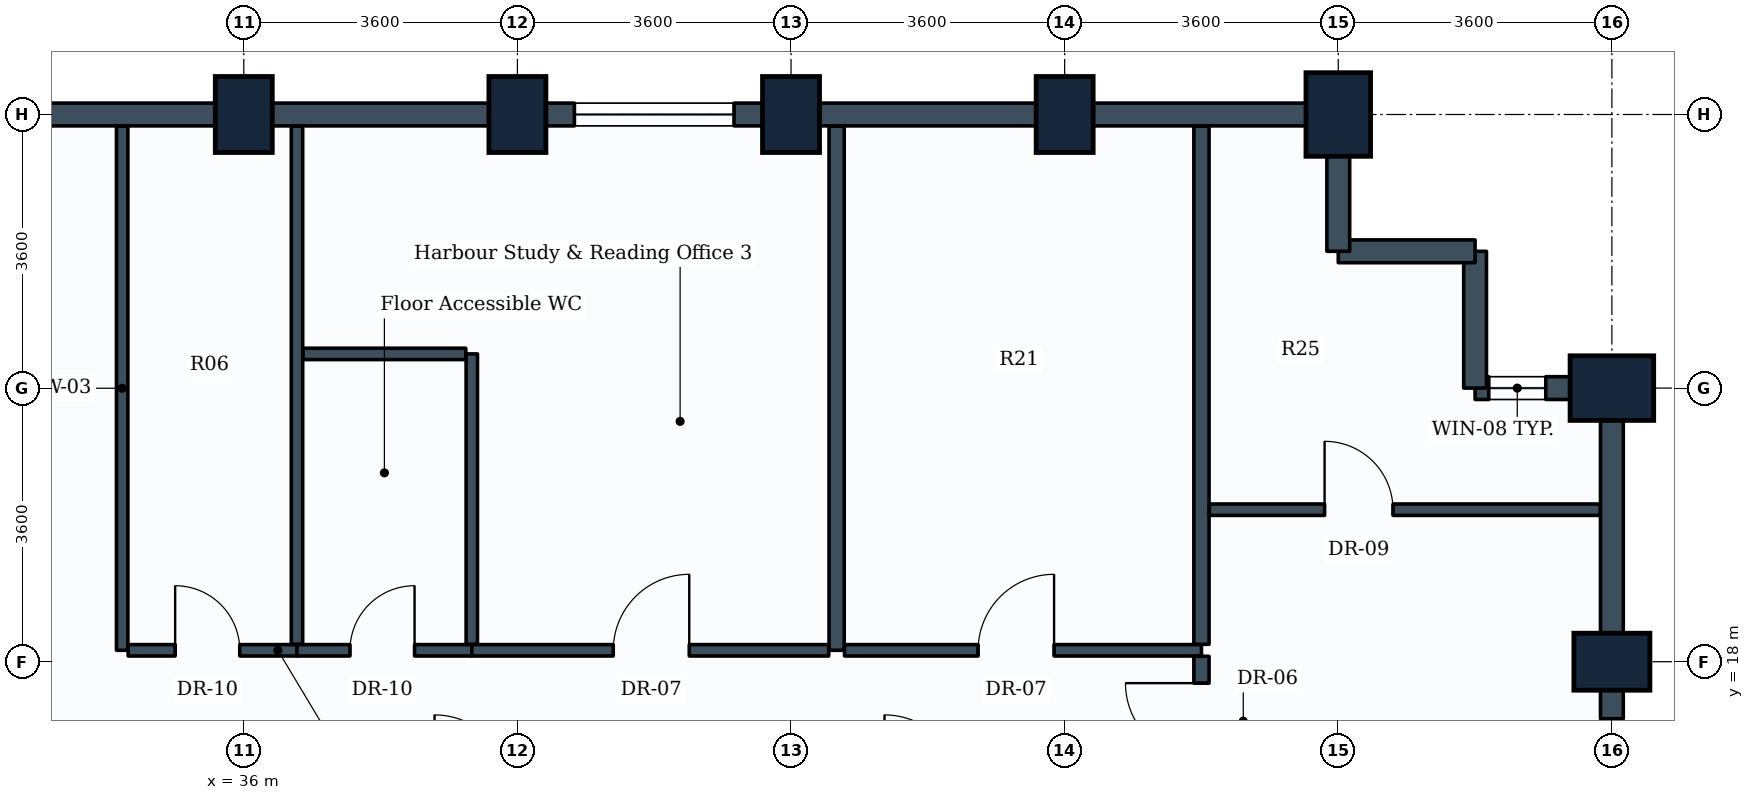
"""IFC4 building model, lengths in metres.
Left out: names, types, materials, properties, quantities, classifications, styles, units other than length and angle.
Written with IfcOpenShell. Run it as: python <this file> out.ifc"""

import sys

from ifc_helpers import new_model, si_unit, direction, frame, frame_2d, origin, origin_2d, place, context, subcontext, project, spatial, rectangle, extrude, element, fill, save


model = new_model("IFC4")
c1 = context("Model", 3, precision=1e-05, world=origin(), true_north=direction((0.0, 1.0)))
c2 = subcontext(c1, "Body", "Model", "MODEL_VIEW")
j1 = project(units=[si_unit("LENGTHUNIT", "METRE"), si_unit("PLANEANGLEUNIT", "RADIAN")], contexts=[c1])
p1 = place(None, origin())
s1 = spatial("IfcSite", under=j1, at=p1, CompositionType="ELEMENT")
p2 = place(p1, origin())
s2 = spatial("IfcBuilding", under=s1, at=p2, CompositionType="ELEMENT")
p3 = place(p2, frame((0.0, 0.0, 131.4)))
s3 = spatial("IfcBuildingStorey", under=s2, at=p3, CompositionType="ELEMENT", Elevation=131.4)
for number, where, z_axis, x_axis in (
    (1, (36.0, 25.2, 0.0), (0.0, 0.0, 1.0), (1.0, 0.0, 0.0)),
    (2, (39.6, 25.2, 0.0), (0.0, 0.0, 1.0), (1.0, 0.0, 0.0)),
    (3, (43.2, 25.2, 0.0), (0.0, 0.0, 1.0), (1.0, 0.0, 0.0)),
    (4, (46.8, 25.2, 0.0), (0.0, 0.0, 1.0), (1.0, 0.0, 0.0)),
):
    element("IfcColumn", number, at=place(p3, frame(where, z_axis=z_axis, x_axis=x_axis)), inside=s3, PredefinedType="COLUMN", context=c2, shape_type="SweptSolid", body=[
        extrude(rectangle(XDim=0.75, YDim=1.0, at=origin_2d()), origin(), (0.0, 0.0, 1.0), 3.8),
    ])
p4 = place(p3, frame((50.4, 25.2, 0.0), z_axis=(0.0, 0.0, 1.0), x_axis=(1.0, 0.0, 0.0)))
e5 = element("IfcColumn", 5, at=p4, inside=s3, PredefinedType="COLUMN", context=c2, shape_type="SweptSolid", body=[
    extrude(rectangle(XDim=0.85, YDim=1.1, at=origin_2d()), origin(), (0.0, 0.0, 1.0), 3.8),
])
p5 = place(p3, frame((54.0, 18.0, 0.0), z_axis=(0.0, 0.0, 1.0), x_axis=(0.0, 1.0, 0.0)))
e6 = element("IfcColumn", 6, at=p5, inside=s3, PredefinedType="COLUMN", context=c2, shape_type="SweptSolid", body=[
    extrude(rectangle(XDim=0.75, YDim=1.0, at=origin_2d()), origin(), (0.0, 0.0, 1.0), 3.8),
])
p6 = place(p3, frame((54.0, 21.6, 0.0), z_axis=(0.0, 0.0, 1.0), x_axis=(0.0, 1.0, 0.0)))
e7 = element("IfcColumn", 7, at=p6, inside=s3, PredefinedType="COLUMN", context=c2, shape_type="SweptSolid", body=[
    extrude(rectangle(XDim=0.85, YDim=1.1, at=origin_2d()), origin(), (0.0, 0.0, 1.0), 3.8),
])
p7 = place(p3, frame((54.0, 18.0, 0.0), z_axis=(0.0, 0.0, 1.0), x_axis=(0.0, -1.0, 0.0)))
e8 = element("IfcWall", 8, at=p7, inside=s3, PredefinedType="STANDARD", context=c2, shape_type="SweptSolid", body=[
    extrude(rectangle(XDim=3.6, YDim=0.3, at=frame_2d((1.8, 0.0))), origin(), (0.0, 0.0, 1.0), 2.93),
])
p8 = place(p7, frame((0.75, 0.0, 0.85)))
e9 = element("IfcOpeningElement", 9, at=p8, cuts=e8, PredefinedType="OPENING", context=c2, shape_type="SweptSolid", body=[
    extrude(rectangle(XDim=2.1, YDim=1.35, at=frame_2d((1.05, 0.675))), frame((0.0, 0.16, 0.0), z_axis=(0.0, -1.0, 0.0), x_axis=(1.0, 0.0, 0.0)), (0.0, 0.0, 1.0), 0.32),
])
p9 = place(p3, frame((54.0, 21.6, 0.0), z_axis=(0.0, 0.0, 1.0), x_axis=(0.0, -1.0, 0.0)))
e10 = element("IfcWall", 10, at=p9, inside=s3, PredefinedType="STANDARD", context=c2, shape_type="SweptSolid", body=[
    extrude(rectangle(XDim=3.6, YDim=0.3, at=frame_2d((1.8, 0.0))), origin(), (0.0, 0.0, 1.0), 2.93),
])
p10 = place(p3, frame((52.2, 21.6, 0.0), z_axis=(0.0, 0.0, 1.0), x_axis=(1.0, 0.0, 0.0)))
e11 = element("IfcWall", 11, at=p10, inside=s3, PredefinedType="STANDARD", context=c2, shape_type="SweptSolid", body=[
    extrude(rectangle(XDim=1.8, YDim=0.3, at=frame_2d((0.9, 0.0))), origin(), (0.0, 0.0, 1.0), 2.93),
])
p11 = place(p10, frame((0.18, 0.0, 0.85)))
e12 = element("IfcOpeningElement", 12, at=p11, cuts=e11, PredefinedType="OPENING", context=c2, shape_type="SweptSolid", body=[
    extrude(rectangle(XDim=0.75, YDim=1.05, at=frame_2d((0.375, 0.525))), frame((0.0, 0.16, 0.0), z_axis=(0.0, -1.0, 0.0), x_axis=(1.0, 0.0, 0.0)), (0.0, 0.0, 1.0), 0.32),
])
p12 = place(p3, frame((52.2, 23.4, 0.0), z_axis=(0.0, 0.0, 1.0), x_axis=(0.0, -1.0, 0.0)))
e13 = element("IfcWall", 13, at=p12, inside=s3, PredefinedType="STANDARD", context=c2, shape_type="SweptSolid", body=[
    extrude(rectangle(XDim=1.8, YDim=0.3, at=frame_2d((0.9, 0.0))), origin(), (0.0, 0.0, 1.0), 3.535),
])
p13 = place(p3, frame((50.4, 23.4, 0.0), z_axis=(0.0, 0.0, 1.0), x_axis=(1.0, 0.0, 0.0)))
e14 = element("IfcWall", 14, at=p13, inside=s3, PredefinedType="STANDARD", context=c2, shape_type="SweptSolid", body=[
    extrude(rectangle(XDim=1.8, YDim=0.3, at=frame_2d((0.9, 0.0))), origin(), (0.0, 0.0, 1.0), 3.535),
])
p14 = place(p3, frame((50.4, 25.2, 0.0), z_axis=(0.0, 0.0, 1.0), x_axis=(0.0, -1.0, 0.0)))
e15 = element("IfcWall", 15, at=p14, inside=s3, PredefinedType="STANDARD", context=c2, shape_type="SweptSolid", body=[
    extrude(rectangle(XDim=1.8, YDim=0.3, at=frame_2d((0.9, 0.0))), origin(), (0.0, 0.0, 1.0), 2.93),
])
p15 = place(p3, frame((46.8, 25.2, 0.0), z_axis=(0.0, 0.0, 1.0), x_axis=(1.0, 0.0, 0.0)))
e16 = element("IfcWall", 16, at=p15, inside=s3, PredefinedType="STANDARD", context=c2, shape_type="SweptSolid", body=[
    extrude(rectangle(XDim=3.6, YDim=0.3, at=frame_2d((1.8, 0.0))), origin(), (0.0, 0.0, 1.0), 2.93),
])
p16 = place(p3, frame((43.2, 25.2, 0.0), z_axis=(0.0, 0.0, 1.0), x_axis=(1.0, 0.0, 0.0)))
e17 = element("IfcWall", 17, at=p16, inside=s3, PredefinedType="STANDARD", context=c2, shape_type="SweptSolid", body=[
    extrude(rectangle(XDim=3.6, YDim=0.3, at=frame_2d((1.8, 0.0))), origin(), (0.0, 0.0, 1.0), 2.93),
])
p17 = place(p3, frame((39.6, 25.2, 0.0), z_axis=(0.0, 0.0, 1.0), x_axis=(1.0, 0.0, 0.0)))
e18 = element("IfcWall", 18, at=p17, inside=s3, PredefinedType="STANDARD", context=c2, shape_type="SweptSolid", body=[
    extrude(rectangle(XDim=3.6, YDim=0.3, at=frame_2d((1.8, 0.0))), origin(), (0.0, 0.0, 1.0), 2.93),
])
p18 = place(p17, frame((0.75, 0.0, 0.85)))
e19 = element("IfcOpeningElement", 19, at=p18, cuts=e18, PredefinedType="OPENING", context=c2, shape_type="SweptSolid", body=[
    extrude(rectangle(XDim=2.1, YDim=1.35, at=frame_2d((1.05, 0.675))), frame((0.0, 0.16, 0.0), z_axis=(0.0, -1.0, 0.0), x_axis=(1.0, 0.0, 0.0)), (0.0, 0.0, 1.0), 0.32),
])
for number, where, z_axis, x_axis in (
    (20, (36.0, 25.2, 0.0), (0.0, 0.0, 1.0), (1.0, 0.0, 0.0)),
    (21, (32.4, 25.2, 0.0), (0.0, 0.0, 1.0), (1.0, 0.0, 0.0)),
):
    element("IfcWall", number, at=place(p3, frame(where, z_axis=z_axis, x_axis=x_axis)), inside=s3, PredefinedType="STANDARD", context=c2, shape_type="SweptSolid", body=[
        extrude(rectangle(XDim=3.6, YDim=0.3, at=frame_2d((1.8, 0.0))), origin(), (0.0, 0.0, 1.0), 2.93),
    ])
p19 = place(p3, frame((34.4, 18.15, 0.0), z_axis=(0.0, 0.0, 1.0), x_axis=(0.0, 1.0, 0.0)))
e22 = element("IfcWall", 22, at=p19, inside=s3, PredefinedType="PARTITIONING", context=c2, shape_type="SweptSolid", body=[
    extrude(rectangle(XDim=6.896, YDim=0.15, at=frame_2d((3.448, 0.0))), origin(), (0.0, 0.0, 1.0), 2.93),
])
p20 = place(p3, frame((34.479, 18.15, 0.0), z_axis=(0.0, 0.0, 1.0), x_axis=(1.0, 0.0, 0.0)))
e23 = element("IfcWall", 23, at=p20, inside=s3, PredefinedType="PARTITIONING", context=c2, shape_type="SweptSolid", body=[
    extrude(rectangle(XDim=2.221, YDim=0.15, at=frame_2d((1.11, 0.0))), origin(), (0.0, 0.0, 1.0), 3.08),
])
p21 = place(p20, frame((0.618, 0.0, 0.0)))
e24 = element("IfcOpeningElement", 24, at=p21, cuts=e23, PredefinedType="OPENING", context=c2, shape_type="SweptSolid", body=[
    extrude(rectangle(XDim=0.85, YDim=2.1, at=frame_2d((0.425, 1.05))), frame((0.0, 0.085, 0.0), z_axis=(0.0, -1.0, 0.0), x_axis=(1.0, 0.0, 0.0)), (0.0, 0.0, 1.0), 0.17),
])
p22 = place(p3, frame((36.7, 18.229, 0.0), z_axis=(0.0, 0.0, 1.0), x_axis=(0.0, 1.0, 0.0)))
e25 = element("IfcWall", 25, at=p22, inside=s3, PredefinedType="PARTITIONING", context=c2, shape_type="SweptSolid", body=[
    extrude(rectangle(XDim=6.817, YDim=0.15, at=frame_2d((3.408, 0.0))), origin(), (0.0, 0.0, 1.0), 2.93),
])
p23 = place(p3, frame((36.7, 18.15, 0.0), z_axis=(0.0, 0.0, 1.0), x_axis=(1.0, 0.0, 0.0)))
e26 = element("IfcWall", 26, at=p23, inside=s3, PredefinedType="PARTITIONING", context=c2, shape_type="SweptSolid", body=[
    extrude(rectangle(XDim=2.3, YDim=0.15, at=frame_2d((1.15, 0.0))), origin(), (0.0, 0.0, 1.0), 3.08),
])
p24 = place(p23, frame((0.697, 0.0, 0.0)))
e27 = element("IfcOpeningElement", 27, at=p24, cuts=e26, PredefinedType="OPENING", context=c2, shape_type="SweptSolid", body=[
    extrude(rectangle(XDim=0.85, YDim=2.1, at=frame_2d((0.425, 1.05))), frame((0.0, 0.085, 0.0), z_axis=(0.0, -1.0, 0.0), x_axis=(1.0, 0.0, 0.0)), (0.0, 0.0, 1.0), 0.17),
])
p25 = place(p3, frame((39.0, 18.229, 0.0), z_axis=(0.0, 0.0, 1.0), x_axis=(0.0, 1.0, 0.0)))
e28 = element("IfcWall", 28, at=p25, inside=s3, PredefinedType="PARTITIONING", context=c2, shape_type="SweptSolid", body=[
    extrude(rectangle(XDim=3.821, YDim=0.15, at=frame_2d((1.911, 0.0))), origin(), (0.0, 0.0, 1.0), 3.08),
])
p26 = place(p3, frame((36.779, 22.05, 0.0), z_axis=(0.0, 0.0, 1.0), x_axis=(1.0, 0.0, 0.0)))
e29 = element("IfcWall", 29, at=p26, inside=s3, PredefinedType="PARTITIONING", context=c2, shape_type="SweptSolid", body=[
    extrude(rectangle(XDim=2.142, YDim=0.15, at=frame_2d((1.071, 0.0))), origin(), (0.0, 0.0, 1.0), 3.535),
])
p27 = place(p3, frame((43.8, 18.15, 0.0), z_axis=(0.0, 0.0, 1.0), x_axis=(0.0, 1.0, 0.0)))
e30 = element("IfcWall", 30, at=p27, inside=s3, PredefinedType="PARTITIONING", context=c2, shape_type="SweptSolid", body=[
    extrude(rectangle(XDim=6.896, YDim=0.2, at=frame_2d((3.448, 0.0))), origin(), (0.0, 0.0, 1.0), 2.93),
])
p28 = place(p3, frame((39.0, 18.15, 0.0), z_axis=(0.0, 0.0, 1.0), x_axis=(1.0, 0.0, 0.0)))
e31 = element("IfcWall", 31, at=p28, inside=s3, PredefinedType="PARTITIONING", context=c2, shape_type="SweptSolid", body=[
    extrude(rectangle(XDim=4.696, YDim=0.15, at=frame_2d((2.348, 0.0))), origin(), (0.0, 0.0, 1.0), 3.08),
])
p29 = place(p28, frame((1.861, 0.0, 0.0)))
e32 = element("IfcOpeningElement", 32, at=p29, cuts=e31, PredefinedType="OPENING", context=c2, shape_type="SweptSolid", body=[
    extrude(rectangle(XDim=1.0, YDim=2.1, at=frame_2d((0.5, 1.05))), frame((0.0, 0.085, 0.0), z_axis=(0.0, -1.0, 0.0), x_axis=(1.0, 0.0, 0.0)), (0.0, 0.0, 1.0), 0.17),
])
p30 = place(p3, frame((43.904, 18.15, 0.0), z_axis=(0.0, 0.0, 1.0), x_axis=(1.0, 0.0, 0.0)))
e33 = element("IfcWall", 33, at=p30, inside=s3, PredefinedType="PARTITIONING", context=c2, shape_type="SweptSolid", body=[
    extrude(rectangle(XDim=4.696, YDim=0.15, at=frame_2d((2.348, 0.0))), origin(), (0.0, 0.0, 1.0), 3.17),
])
p31 = place(p30, frame((1.757, 0.0, 0.0)))
e34 = element("IfcOpeningElement", 34, at=p31, cuts=e33, PredefinedType="OPENING", context=c2, shape_type="SweptSolid", body=[
    extrude(rectangle(XDim=1.0, YDim=2.1, at=frame_2d((0.5, 1.05))), frame((0.0, 0.085, 0.0), z_axis=(0.0, -1.0, 0.0), x_axis=(1.0, 0.0, 0.0)), (0.0, 0.0, 1.0), 0.17),
])
p32 = place(p3, frame((48.6, 18.229, 0.0), z_axis=(0.0, 0.0, 1.0), x_axis=(0.0, 1.0, 0.0)))
e35 = element("IfcWall", 35, at=p32, inside=s3, PredefinedType="PARTITIONING", context=c2, shape_type="SweptSolid", body=[
    extrude(rectangle(XDim=6.817, YDim=0.2, at=frame_2d((3.408, 0.0))), origin(), (0.0, 0.0, 1.0), 2.93),
])
p33 = place(p3, frame((48.6, 16.404, 0.0), z_axis=(0.0, 0.0, 1.0), x_axis=(0.0, 1.0, 0.0)))
e36 = element("IfcWall", 36, at=p33, inside=s3, PredefinedType="PARTITIONING", context=c2, shape_type="SweptSolid", body=[
    extrude(rectangle(XDim=1.667, YDim=0.2, at=frame_2d((0.833, 0.0))), origin(), (0.0, 0.0, 1.0), 3.535),
])
p34 = place(p33, frame((0.314, 0.0, 0.0)))
e37 = element("IfcOpeningElement", 37, at=p34, cuts=e36, PredefinedType="OPENING", context=c2, shape_type="SweptSolid", body=[
    extrude(rectangle(XDim=1.0, YDim=2.1, at=frame_2d((0.5, 1.05))), frame((0.0, 0.11, 0.0), z_axis=(0.0, -1.0, 0.0), x_axis=(1.0, 0.0, 0.0)), (0.0, 0.0, 1.0), 0.22),
])
p35 = place(p3, frame((48.704, 20.0, 0.0), z_axis=(0.0, 0.0, 1.0), x_axis=(1.0, 0.0, 0.0)))
e38 = element("IfcWall", 38, at=p35, inside=s3, PredefinedType="PARTITIONING", context=c2, shape_type="SweptSolid", body=[
    extrude(rectangle(XDim=5.142, YDim=0.15, at=frame_2d((2.571, 0.0))), origin(), (0.0, 0.0, 1.0), 2.93),
])
p36 = place(p35, frame((1.516, 0.0, 0.0)))
e39 = element("IfcOpeningElement", 39, at=p36, cuts=e38, PredefinedType="OPENING", context=c2, shape_type="SweptSolid", body=[
    extrude(rectangle(XDim=0.9, YDim=2.1, at=frame_2d((0.45, 1.05))), frame((0.0, 0.085, 0.0), z_axis=(0.0, -1.0, 0.0), x_axis=(1.0, 0.0, 0.0)), (0.0, 0.0, 1.0), 0.17),
])
p37 = place(p8, origin())
e40 = element("IfcWindow", 40, at=p37, inside=s3, PartitioningType="SINGLE_PANEL", PredefinedType="WINDOW", context=c2, shape_type="SweptSolid", body=[
    extrude(rectangle(XDim=2.1, YDim=1.35, at=frame_2d((1.05, 0.675))), frame((0.0, 0.03, 0.0), z_axis=(0.0, -1.0, 0.0), x_axis=(1.0, 0.0, 0.0)), (0.0, 0.0, 1.0), 0.06),
])
fill(e9, e40)
p38 = place(p18, origin())
e41 = element("IfcWindow", 41, at=p38, inside=s3, PartitioningType="SINGLE_PANEL", PredefinedType="WINDOW", context=c2, shape_type="SweptSolid", body=[
    extrude(rectangle(XDim=2.1, YDim=1.35, at=frame_2d((1.05, 0.675))), frame((0.0, 0.03, 0.0), z_axis=(0.0, -1.0, 0.0), x_axis=(1.0, 0.0, 0.0)), (0.0, 0.0, 1.0), 0.06),
])
fill(e19, e41)
p39 = place(p21, origin())
e42 = element("IfcDoor", 42, at=p39, inside=s3, OperationType="SINGLE_SWING_LEFT", PredefinedType="DOOR", context=c2, shape_type="SweptSolid", body=[
    extrude(rectangle(XDim=0.85, YDim=2.1, at=frame_2d((0.425, 1.05))), frame((0.0, 0.025, 0.0), z_axis=(0.0, -1.0, 0.0), x_axis=(1.0, 0.0, 0.0)), (0.0, 0.0, 1.0), 0.05),
])
fill(e24, e42)
p40 = place(p24, origin())
e43 = element("IfcDoor", 43, at=p40, inside=s3, OperationType="SINGLE_SWING_RIGHT", PredefinedType="DOOR", context=c2, shape_type="SweptSolid", body=[
    extrude(rectangle(XDim=0.85, YDim=2.1, at=frame_2d((0.425, 1.05))), frame((0.0, 0.025, 0.0), z_axis=(0.0, -1.0, 0.0), x_axis=(1.0, 0.0, 0.0)), (0.0, 0.0, 1.0), 0.05),
])
fill(e27, e43)
p41 = place(p29, origin())
e44 = element("IfcDoor", 44, at=p41, inside=s3, OperationType="SINGLE_SWING_RIGHT", PredefinedType="DOOR", context=c2, shape_type="SweptSolid", body=[
    extrude(rectangle(XDim=1.0, YDim=2.1, at=frame_2d((0.5, 1.05))), frame((0.0, 0.025, 0.0), z_axis=(0.0, -1.0, 0.0), x_axis=(1.0, 0.0, 0.0)), (0.0, 0.0, 1.0), 0.05),
])
fill(e32, e44)
p42 = place(p31, origin())
e45 = element("IfcDoor", 45, at=p42, inside=s3, OperationType="SINGLE_SWING_RIGHT", PredefinedType="DOOR", context=c2, shape_type="SweptSolid", body=[
    extrude(rectangle(XDim=1.0, YDim=2.1, at=frame_2d((0.5, 1.05))), frame((0.0, 0.025, 0.0), z_axis=(0.0, -1.0, 0.0), x_axis=(1.0, 0.0, 0.0)), (0.0, 0.0, 1.0), 0.05),
])
fill(e34, e45)
p43 = place(p34, origin())
e46 = element("IfcDoor", 46, at=p43, inside=s3, OperationType="SINGLE_SWING_RIGHT", PredefinedType="DOOR", context=c2, shape_type="SweptSolid", body=[
    extrude(rectangle(XDim=1.0, YDim=2.1, at=frame_2d((0.5, 1.05))), frame((0.0, 0.025, 0.0), z_axis=(0.0, -1.0, 0.0), x_axis=(1.0, 0.0, 0.0)), (0.0, 0.0, 1.0), 0.05),
])
fill(e37, e46)
p44 = place(p36, origin())
e47 = element("IfcDoor", 47, at=p44, inside=s3, OperationType="SINGLE_SWING_LEFT", PredefinedType="DOOR", context=c2, shape_type="SweptSolid", body=[
    extrude(rectangle(XDim=0.9, YDim=2.1, at=frame_2d((0.45, 1.05))), frame((0.0, 0.025, 0.0), z_axis=(0.0, -1.0, 0.0), x_axis=(1.0, 0.0, 0.0)), (0.0, 0.0, 1.0), 0.05),
])
fill(e39, e47)
p45 = place(p11, origin())
e48 = element("IfcWindow", 48, at=p45, inside=s3, PartitioningType="SINGLE_PANEL", PredefinedType="WINDOW", context=c2, shape_type="SweptSolid", body=[
    extrude(rectangle(XDim=0.75, YDim=1.05, at=frame_2d((0.375, 0.525))), frame((0.0, 0.03, 0.0), z_axis=(0.0, -1.0, 0.0), x_axis=(1.0, 0.0, 0.0)), (0.0, 0.0, 1.0), 0.06),
])
fill(e12, e48)
save(model, sys.argv[1])
